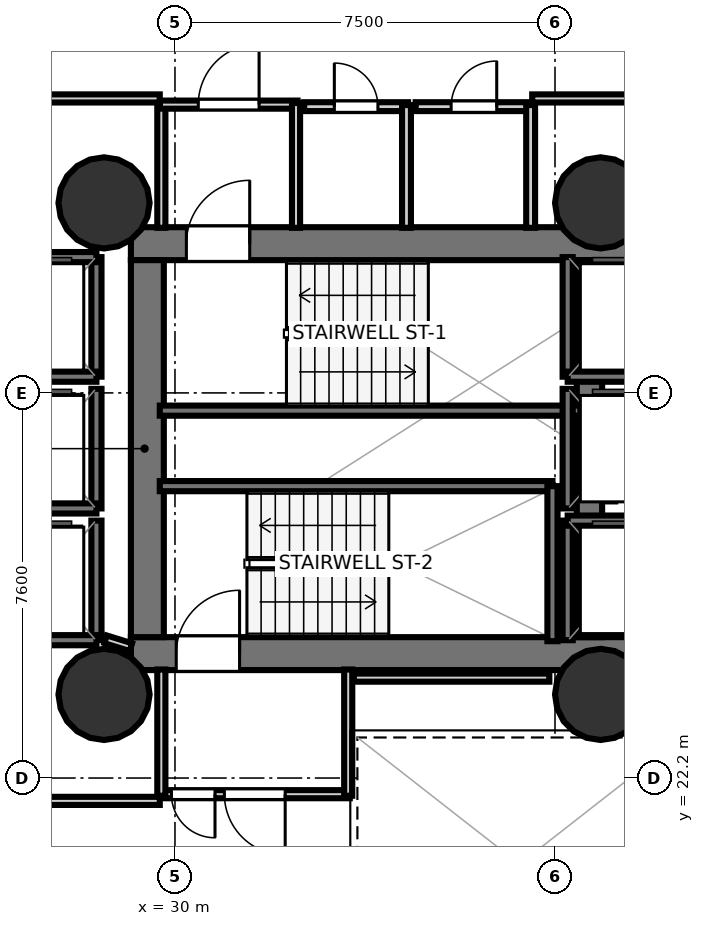
"""IFC4 building model, lengths in metres.
Left out: names, types, materials, properties, quantities, classifications, styles, units other than length and angle.
Written with IfcOpenShell. Run it as: python <this file> out.ifc"""

import sys

from ifc_helpers import new_model, si_unit, direction, frame, frame_2d, origin, origin_2d, place, context, subcontext, project, spatial, rectangle, hollow_circle, extrude, element, fill, save


model = new_model("IFC4")
c1 = context("Model", 3, precision=1e-05, world=origin(), true_north=direction((0.0, 1.0)))
c2 = subcontext(c1, "Body", "Model", "MODEL_VIEW")
j1 = project(units=[si_unit("LENGTHUNIT", "METRE"), si_unit("PLANEANGLEUNIT", "RADIAN")], contexts=[c1])
p1 = place(None, origin())
s1 = spatial("IfcSite", under=j1, at=p1, CompositionType="ELEMENT")
p2 = place(p1, origin())
s2 = spatial("IfcBuilding", under=s1, at=p2, CompositionType="ELEMENT")
p3 = place(p2, frame((0.0, 0.0, 36.8)))
s3 = spatial("IfcBuildingStorey", under=s2, at=p3, CompositionType="ELEMENT", Elevation=36.8)
p4 = place(p3, frame((29.13, 32.745, 0.0), z_axis=(0.0, 0.0, 1.0), x_axis=(1.0, 0.0, 0.0)))
e1 = element("IfcWall", 1, at=p4, inside=s3, PredefinedType="SHEAR", context=c2, shape_type="SweptSolid", body=[
    extrude(rectangle(XDim=10.72, YDim=0.65, at=frame_2d((5.36, 0.0))), origin(), (0.0, 0.0, 1.0), 3.52),
])
p5 = place(p4, frame((1.095, 0.0, 0.0)))
e2 = element("IfcOpeningElement", 2, at=p5, cuts=e1, PredefinedType="OPENING", context=c2, shape_type="SweptSolid", body=[
    extrude(rectangle(XDim=1.25, YDim=2.15, at=frame_2d((0.625, 1.075))), frame((0.0, 0.335, 0.0), z_axis=(0.0, -1.0, 0.0), x_axis=(1.0, 0.0, 0.0)), (0.0, 0.0, 1.0), 0.67),
])
p6 = place(p3, frame((29.13, 24.655, 0.0), z_axis=(0.0, 0.0, 1.0), x_axis=(1.0, 0.0, 0.0)))
e3 = element("IfcWall", 3, at=p6, inside=s3, PredefinedType="SHEAR", context=c2, shape_type="SweptSolid", body=[
    extrude(rectangle(XDim=10.72, YDim=0.65, at=frame_2d((5.36, 0.0))), origin(), (0.0, 0.0, 1.0), 3.52),
])
p7 = place(p6, frame((0.895, 0.0, 0.0)))
e4 = element("IfcOpeningElement", 4, at=p7, cuts=e3, PredefinedType="OPENING", context=c2, shape_type="SweptSolid", body=[
    extrude(rectangle(XDim=1.25, YDim=2.15, at=frame_2d((0.625, 1.075))), frame((0.0, 0.335, 0.0), z_axis=(0.0, -1.0, 0.0), x_axis=(1.0, 0.0, 0.0)), (0.0, 0.0, 1.0), 0.67),
])
p8 = place(p3, frame((29.455, 24.98, 0.0), z_axis=(0.0, 0.0, 1.0), x_axis=(0.0, 1.0, 0.0)))
e5 = element("IfcWall", 5, at=p8, inside=s3, PredefinedType="SHEAR", context=c2, shape_type="SweptSolid", body=[
    extrude(rectangle(XDim=7.44, YDim=0.65, at=frame_2d((3.72, 0.0))), origin(), (0.0, 0.0, 1.0), 3.52),
])
p9 = place(p3, frame((38.18, 24.98, 0.0), z_axis=(0.0, 0.0, 1.0), x_axis=(0.0, 1.0, 0.0)))
e6 = element("IfcWall", 6, at=p9, inside=s3, PredefinedType="SHEAR", context=c2, shape_type="SweptSolid", body=[
    extrude(rectangle(XDim=7.44, YDim=0.5, at=frame_2d((3.72, 0.0))), origin(), (0.0, 0.0, 1.0), 3.52),
])
for number, where, z_axis, x_axis in (
    (7, (28.6, 33.55, 0.0), (0.0, 0.0, 1.0), (1.0, 0.0, 0.0)),
    (8, (28.6, 23.85, 0.0), (0.0, 0.0, 1.0), (1.0, 0.0, 0.0)),
    (9, (38.4, 33.55, 0.0), (0.0, 0.0, 1.0), (1.0, 0.0, 0.0)),
    (10, (38.4, 23.85, 0.0), (0.0, 0.0, 1.0), (1.0, 0.0, 0.0)),
):
    element("IfcColumn", number, at=place(p3, frame(where, z_axis=z_axis, x_axis=x_axis)), inside=s3, PredefinedType="COLUMN", context=c2, shape_type="SweptSolid", body=[
        extrude(hollow_circle(Radius=0.9, WallThickness=0.045, at=origin_2d()), origin(), (0.0, 0.0, 1.0), 3.7),
    ])
p10 = place(p3, frame((29.7, 29.45, 0.0), z_axis=(0.0, 0.0, 1.0), x_axis=(1.0, 0.0, 0.0)))
e11 = element("IfcWall", 11, at=p10, inside=s3, PredefinedType="SOLIDWALL", context=c2, shape_type="SweptSolid", body=[
    extrude(rectangle(XDim=8.3, YDim=0.2, at=frame_2d((4.15, 0.0))), origin(), (0.0, 0.0, 1.0), 3.52),
])
p11 = place(p3, frame((29.7, 27.96, 0.0), z_axis=(0.0, 0.0, 1.0), x_axis=(1.0, 0.0, 0.0)))
e12 = element("IfcWall", 12, at=p11, inside=s3, PredefinedType="SOLIDWALL", context=c2, shape_type="SweptSolid", body=[
    extrude(rectangle(XDim=7.75, YDim=0.2, at=frame_2d((3.875, 0.0))), origin(), (0.0, 0.0, 1.0), 3.52),
])
p12 = place(p3, frame((37.45, 24.9, 0.0), z_axis=(0.0, 0.0, 1.0), x_axis=(0.0, 1.0, 0.0)))
e13 = element("IfcWall", 13, at=p12, inside=s3, PredefinedType="SOLIDWALL", context=c2, shape_type="SweptSolid", body=[
    extrude(rectangle(XDim=3.06, YDim=0.2, at=frame_2d((1.53, 0.0))), origin(), (0.0, 0.0, 1.0), 3.52),
])
p13 = place(p3, frame((37.75, 30.12, 0.0), z_axis=(0.0, 0.0, 1.0), x_axis=(0.0, 1.0, 0.0)))
e14 = element("IfcWall", 14, at=p13, inside=s3, PredefinedType="SOLIDWALL", context=c2, shape_type="SweptSolid", body=[
    extrude(rectangle(XDim=2.36, YDim=0.2, at=frame_2d((1.18, 0.0))), origin(), (0.0, 0.0, 1.0), 3.52),
])
p14 = place(p3, frame((37.75, 30.12, 0.0), z_axis=(0.0, 0.0, 1.0), x_axis=(1.0, 0.0, 0.0)))
e15 = element("IfcWall", 15, at=p14, inside=s3, PredefinedType="SOLIDWALL", context=c2, shape_type="SweptSolid", body=[
    extrude(rectangle(XDim=2.1, YDim=0.2, at=frame_2d((1.05, 0.0))), origin(), (0.0, 0.0, 1.0), 3.52),
])
p15 = place(p3, frame((37.75, 24.92, 0.0), z_axis=(0.0, 0.0, 1.0), x_axis=(0.0, 1.0, 0.0)))
e16 = element("IfcWall", 16, at=p15, inside=s3, PredefinedType="SOLIDWALL", context=c2, shape_type="SweptSolid", body=[
    extrude(rectangle(XDim=2.36, YDim=0.2, at=frame_2d((1.18, 0.0))), origin(), (0.0, 0.0, 1.0), 3.52),
])
p16 = place(p3, frame((37.75, 27.28, 0.0), z_axis=(0.0, 0.0, 1.0), x_axis=(1.0, 0.0, 0.0)))
e17 = element("IfcWall", 17, at=p16, inside=s3, PredefinedType="SOLIDWALL", context=c2, shape_type="SweptSolid", body=[
    extrude(rectangle(XDim=2.1, YDim=0.2, at=frame_2d((1.05, 0.0))), origin(), (0.0, 0.0, 1.0), 3.52),
])
p17 = place(p3, frame((28.45, 30.12, 0.0), z_axis=(0.0, 0.0, 1.0), x_axis=(0.0, 1.0, 0.0)))
e18 = element("IfcWall", 18, at=p17, inside=s3, PredefinedType="SOLIDWALL", context=c2, shape_type="SweptSolid", body=[
    extrude(rectangle(XDim=2.36, YDim=0.2, at=frame_2d((1.18, 0.0))), origin(), (0.0, 0.0, 1.0), 3.52),
])
for number, where, z_axis, x_axis in (
    (19, (26.35, 32.48, 0.0), (0.0, 0.0, 1.0), (1.0, 0.0, 0.0)),
    (20, (26.35, 30.12, 0.0), (0.0, 0.0, 1.0), (1.0, 0.0, 0.0)),
):
    element("IfcWall", number, at=place(p3, frame(where, z_axis=z_axis, x_axis=x_axis)), inside=s3, PredefinedType="SOLIDWALL", context=c2, shape_type="SweptSolid", body=[
        extrude(rectangle(XDim=2.1, YDim=0.2, at=frame_2d((1.05, 0.0))), origin(), (0.0, 0.0, 1.0), 3.52),
    ])
p18 = place(p3, frame((28.45, 27.52, 0.0), z_axis=(0.0, 0.0, 1.0), x_axis=(0.0, 1.0, 0.0)))
e21 = element("IfcWall", 21, at=p18, inside=s3, PredefinedType="SOLIDWALL", context=c2, shape_type="SweptSolid", body=[
    extrude(rectangle(XDim=2.36, YDim=0.2, at=frame_2d((1.18, 0.0))), origin(), (0.0, 0.0, 1.0), 3.52),
])
p19 = place(p3, frame((26.35, 27.52, 0.0), z_axis=(0.0, 0.0, 1.0), x_axis=(1.0, 0.0, 0.0)))
e22 = element("IfcWall", 22, at=p19, inside=s3, PredefinedType="SOLIDWALL", context=c2, shape_type="SweptSolid", body=[
    extrude(rectangle(XDim=2.1, YDim=0.2, at=frame_2d((1.05, 0.0))), origin(), (0.0, 0.0, 1.0), 3.52),
])
p20 = place(p3, frame((28.45, 24.92, 0.0), z_axis=(0.0, 0.0, 1.0), x_axis=(0.0, 1.0, 0.0)))
e23 = element("IfcWall", 23, at=p20, inside=s3, PredefinedType="SOLIDWALL", context=c2, shape_type="SweptSolid", body=[
    extrude(rectangle(XDim=2.36, YDim=0.2, at=frame_2d((1.18, 0.0))), origin(), (0.0, 0.0, 1.0), 3.52),
])
p21 = place(p3, frame((26.35, 24.92, 0.0), z_axis=(0.0, 0.0, 1.0), x_axis=(1.0, 0.0, 0.0)))
e24 = element("IfcWall", 24, at=p21, inside=s3, PredefinedType="SOLIDWALL", context=c2, shape_type="SweptSolid", body=[
    extrude(rectangle(XDim=2.1, YDim=0.2, at=frame_2d((1.05, 0.0))), origin(), (0.0, 0.0, 1.0), 3.52),
])
p22 = place(p3, frame((37.75, 27.52, 0.0), z_axis=(0.0, 0.0, 1.0), x_axis=(0.0, 1.0, 0.0)))
e25 = element("IfcWall", 25, at=p22, inside=s3, PredefinedType="SOLIDWALL", context=c2, shape_type="SweptSolid", body=[
    extrude(rectangle(XDim=2.36, YDim=0.2, at=frame_2d((1.18, 0.0))), origin(), (0.0, 0.0, 1.0), 3.52),
])
p23 = place(p3, frame((29.731, 33.058, 0.0), z_axis=(0.0, 0.0, 1.0), x_axis=(0.0, 1.0, 0.0)))
e26 = element("IfcWall", 26, at=p23, inside=s3, PredefinedType="PARTITIONING", context=c2, shape_type="SweptSolid", body=[
    extrude(rectangle(XDim=2.462, YDim=0.16, at=frame_2d((1.231, 0.0))), origin(), (0.0, 0.0, 1.0), 2.84),
])
p24 = place(p3, frame((29.7, 35.489, 0.0), z_axis=(0.0, 0.0, 1.0), x_axis=(1.0, 0.0, 0.0)))
e27 = element("IfcWall", 27, at=p24, inside=s3, PredefinedType="PARTITIONING", context=c2, shape_type="SweptSolid", body=[
    extrude(rectangle(XDim=2.72, YDim=0.16, at=frame_2d((1.36, 0.0))), origin(), (0.0, 0.0, 1.0), 2.84),
])
p25 = place(p24, frame((0.76, 0.0, 0.0)))
e28 = element("IfcOpeningElement", 28, at=p25, cuts=e27, PredefinedType="OPENING", context=c2, shape_type="SweptSolid", body=[
    extrude(rectangle(XDim=1.2, YDim=2.15, at=frame_2d((0.6, 1.075))), frame((0.0, 0.09, 0.0), z_axis=(0.0, -1.0, 0.0), x_axis=(1.0, 0.0, 0.0)), (0.0, 0.0, 1.0), 0.18),
])
p26 = place(p3, frame((32.389, 35.52, 0.0), z_axis=(0.0, 0.0, 1.0), x_axis=(0.0, -1.0, 0.0)))
e29 = element("IfcWall", 29, at=p26, inside=s3, PredefinedType="PARTITIONING", context=c2, shape_type="SweptSolid", body=[
    extrude(rectangle(XDim=2.462, YDim=0.16, at=frame_2d((1.231, 0.0))), origin(), (0.0, 0.0, 1.0), 2.84),
])
p27 = place(p3, frame((33.45, 21.881, 0.0), z_axis=(0.0, 0.0, 1.0), x_axis=(-1.0, 0.0, 0.0)))
e30 = element("IfcWall", 30, at=p27, inside=s3, PredefinedType="PARTITIONING", context=c2, shape_type="SweptSolid", body=[
    extrude(rectangle(XDim=3.75, YDim=0.16, at=frame_2d((1.875, 0.0))), origin(), (0.0, 0.0, 1.0), 2.84),
])
p28 = place(p27, frame((1.275, 0.0, 0.0)))
e31 = element("IfcOpeningElement", 31, at=p28, cuts=e30, PredefinedType="OPENING", context=c2, shape_type="SweptSolid", body=[
    extrude(rectangle(XDim=1.2, YDim=2.15, at=frame_2d((0.6, 1.075))), frame((0.0, 0.09, 0.0), z_axis=(0.0, -1.0, 0.0), x_axis=(1.0, 0.0, 0.0)), (0.0, 0.0, 1.0), 0.18),
])
p29 = place(p27, frame((2.66, 0.0, 0.0)))
e32 = element("IfcOpeningElement", 32, at=p29, cuts=e30, PredefinedType="OPENING", context=c2, shape_type="SweptSolid", body=[
    extrude(rectangle(XDim=0.86, YDim=2.05, at=frame_2d((0.43, 1.025))), frame((0.0, 0.09, 0.0), z_axis=(0.0, -1.0, 0.0), x_axis=(1.0, 0.0, 0.0)), (0.0, 0.0, 1.0), 0.18),
])
for number, where, z_axis, x_axis in (
    (33, (29.731, 21.85, 0.0), (0.0, 0.0, 1.0), (0.0, 1.0, 0.0)),
    (34, (33.419, 24.342, 0.0), (0.0, 0.0, 1.0), (0.0, -1.0, 0.0)),
):
    element("IfcWall", number, at=place(p3, frame(where, z_axis=z_axis, x_axis=x_axis)), inside=s3, PredefinedType="PARTITIONING", context=c2, shape_type="SweptSolid", body=[
        extrude(rectangle(XDim=2.492, YDim=0.16, at=frame_2d((1.246, 0.0))), origin(), (0.0, 0.0, 1.0), 2.84),
    ])
p30 = place(p3, frame((32.55, 35.449, 0.0), z_axis=(0.0, 0.0, 1.0), x_axis=(1.0, 0.0, 0.0)))
e35 = element("IfcWall", 35, at=p30, inside=s3, PredefinedType="PLUMBINGWALL", context=c2, shape_type="SweptSolid", body=[
    extrude(rectangle(XDim=2.05, YDim=0.175, at=frame_2d((1.025, 0.0))), origin(), (0.0, 0.0, 1.0), 2.84),
])
p31 = place(p30, frame((0.595, 0.0, 0.0)))
e36 = element("IfcOpeningElement", 36, at=p31, cuts=e35, PredefinedType="OPENING", context=c2, shape_type="SweptSolid", body=[
    extrude(rectangle(XDim=0.86, YDim=2.05, at=frame_2d((0.43, 1.025))), frame((0.0, 0.097, 0.0), z_axis=(0.0, -1.0, 0.0), x_axis=(1.0, 0.0, 0.0)), (0.0, 0.0, 1.0), 0.195),
])
p32 = place(p3, frame((34.569, 35.48, 0.0), z_axis=(0.0, 0.0, 1.0), x_axis=(0.0, -1.0, 0.0)))
e37 = element("IfcWall", 37, at=p32, inside=s3, PredefinedType="PLUMBINGWALL", context=c2, shape_type="SweptSolid", body=[
    extrude(rectangle(XDim=2.422, YDim=0.175, at=frame_2d((1.211, 0.0))), origin(), (0.0, 0.0, 1.0), 2.84),
])
p33 = place(p3, frame((34.75, 35.449, 0.0), z_axis=(0.0, 0.0, 1.0), x_axis=(1.0, 0.0, 0.0)))
e38 = element("IfcWall", 38, at=p33, inside=s3, PredefinedType="PLUMBINGWALL", context=c2, shape_type="SweptSolid", body=[
    extrude(rectangle(XDim=2.3, YDim=0.175, at=frame_2d((1.15, 0.0))), origin(), (0.0, 0.0, 1.0), 2.84),
])
p34 = place(p33, frame((0.7, 0.0, 0.0)))
e39 = element("IfcOpeningElement", 39, at=p34, cuts=e38, PredefinedType="OPENING", context=c2, shape_type="SweptSolid", body=[
    extrude(rectangle(XDim=0.9, YDim=2.1, at=frame_2d((0.45, 1.05))), frame((0.0, 0.097, 0.0), z_axis=(0.0, -1.0, 0.0), x_axis=(1.0, 0.0, 0.0)), (0.0, 0.0, 1.0), 0.195),
])
p35 = place(p3, frame((37.019, 35.48, 0.0), z_axis=(0.0, 0.0, 1.0), x_axis=(0.0, -1.0, 0.0)))
e40 = element("IfcWall", 40, at=p35, inside=s3, PredefinedType="PLUMBINGWALL", context=c2, shape_type="SweptSolid", body=[
    extrude(rectangle(XDim=2.422, YDim=0.175, at=frame_2d((1.211, 0.0))), origin(), (0.0, 0.0, 1.0), 2.84),
])
p36 = place(p3, frame((29.13, 24.782, 0.0), z_axis=(0.0, 0.0, 1.0), x_axis=(-0.955000482512, 0.296604245422, 0.0)))
e41 = element("IfcWall", 41, at=p36, inside=s3, PredefinedType="PARTITIONING", context=c2, shape_type="SweptSolid", body=[
    extrude(rectangle(XDim=0.524, YDim=0.16, at=frame_2d((0.262, 0.0))), origin(), (0.0, 0.0, 1.0), 2.84),
])
p37 = place(p3, frame((37.389, 24.181, 0.0), z_axis=(0.0, 0.0, 1.0), x_axis=(-1.0, 0.0, 0.0)))
e42 = element("IfcWall", 42, at=p37, inside=s3, PredefinedType="PARTITIONING", context=c2, shape_type="SweptSolid", body=[
    extrude(rectangle(XDim=3.859, YDim=0.16, at=frame_2d((1.929, 0.0))), origin(), (0.0, 0.0, 1.0), 2.84),
])
p38 = place(p3, frame((39.818, 35.611, 0.0), z_axis=(0.0, 0.0, 1.0), x_axis=(-1.0, 0.0, 0.0)))
e43 = element("IfcWall", 43, at=p38, inside=s3, PredefinedType="PARTITIONING", context=c2, shape_type="SweptSolid", body=[
    extrude(rectangle(XDim=2.768, YDim=0.16, at=frame_2d((1.384, 0.0))), origin(), (0.0, 0.0, 1.0), 2.84),
])
p39 = place(p3, frame((29.7, 35.611, 0.0), z_axis=(0.0, 0.0, 1.0), x_axis=(-1.0, 0.0, 0.0)))
e44 = element("IfcWall", 44, at=p39, inside=s3, PredefinedType="PARTITIONING", context=c2, shape_type="SweptSolid", body=[
    extrude(rectangle(XDim=3.28, YDim=0.16, at=frame_2d((1.64, 0.0))), origin(), (0.0, 0.0, 1.0), 2.798),
])
p40 = place(p3, frame((26.42, 21.749, 0.0), z_axis=(0.0, 0.0, 1.0), x_axis=(1.0, 0.0, 0.0)))
e45 = element("IfcWall", 45, at=p40, inside=s3, PredefinedType="PARTITIONING", context=c2, shape_type="SweptSolid", body=[
    extrude(rectangle(XDim=3.28, YDim=0.16, at=frame_2d((1.64, 0.0))), origin(), (0.0, 0.0, 1.0), 2.84),
])
p41 = place(p5, origin())
e46 = element("IfcDoor", 46, at=p41, inside=s3, OperationType="SINGLE_SWING_RIGHT", PredefinedType="DOOR", context=c2, shape_type="SweptSolid", body=[
    extrude(rectangle(XDim=1.25, YDim=2.15, at=frame_2d((0.625, 1.075))), frame((0.0, 0.025, 0.0), z_axis=(0.0, -1.0, 0.0), x_axis=(1.0, 0.0, 0.0)), (0.0, 0.0, 1.0), 0.05),
])
fill(e2, e46)
p42 = place(p7, origin())
e47 = element("IfcDoor", 47, at=p42, inside=s3, OperationType="SINGLE_SWING_RIGHT", PredefinedType="DOOR", context=c2, shape_type="SweptSolid", body=[
    extrude(rectangle(XDim=1.25, YDim=2.15, at=frame_2d((0.625, 1.075))), frame((0.0, 0.025, 0.0), z_axis=(0.0, -1.0, 0.0), x_axis=(1.0, 0.0, 0.0)), (0.0, 0.0, 1.0), 0.05),
])
fill(e4, e47)
p43 = place(p25, origin())
e48 = element("IfcDoor", 48, at=p43, inside=s3, OperationType="SINGLE_SWING_RIGHT", PredefinedType="DOOR", context=c2, shape_type="SweptSolid", body=[
    extrude(rectangle(XDim=1.2, YDim=2.15, at=frame_2d((0.6, 1.075))), frame((0.0, 0.025, 0.0), z_axis=(0.0, -1.0, 0.0), x_axis=(1.0, 0.0, 0.0)), (0.0, 0.0, 1.0), 0.05),
])
fill(e28, e48)
p44 = place(p28, origin())
e49 = element("IfcDoor", 49, at=p44, inside=s3, OperationType="SINGLE_SWING_LEFT", PredefinedType="DOOR", context=c2, shape_type="SweptSolid", body=[
    extrude(rectangle(XDim=1.2, YDim=2.15, at=frame_2d((0.6, 1.075))), frame((0.0, 0.025, 0.0), z_axis=(0.0, -1.0, 0.0), x_axis=(1.0, 0.0, 0.0)), (0.0, 0.0, 1.0), 0.05),
])
fill(e31, e49)
p45 = place(p31, origin())
e50 = element("IfcDoor", 50, at=p45, inside=s3, OperationType="SINGLE_SWING_LEFT", PredefinedType="DOOR", context=c2, shape_type="SweptSolid", body=[
    extrude(rectangle(XDim=0.86, YDim=2.05, at=frame_2d((0.43, 1.025))), frame((0.0, 0.025, 0.0), z_axis=(0.0, -1.0, 0.0), x_axis=(1.0, 0.0, 0.0)), (0.0, 0.0, 1.0), 0.05),
])
fill(e36, e50)
p46 = place(p34, origin())
e51 = element("IfcDoor", 51, at=p46, inside=s3, OperationType="SINGLE_SWING_RIGHT", PredefinedType="DOOR", context=c2, shape_type="SweptSolid", body=[
    extrude(rectangle(XDim=0.9, YDim=2.1, at=frame_2d((0.45, 1.05))), frame((0.0, 0.025, 0.0), z_axis=(0.0, -1.0, 0.0), x_axis=(1.0, 0.0, 0.0)), (0.0, 0.0, 1.0), 0.05),
])
fill(e39, e51)
p47 = place(p29, origin())
e52 = element("IfcDoor", 52, at=p47, inside=s3, OperationType="SINGLE_SWING_LEFT", PredefinedType="DOOR", context=c2, shape_type="SweptSolid", body=[
    extrude(rectangle(XDim=0.86, YDim=2.05, at=frame_2d((0.43, 1.025))), frame((0.0, 0.025, 0.0), z_axis=(0.0, -1.0, 0.0), x_axis=(1.0, 0.0, 0.0)), (0.0, 0.0, 1.0), 0.05),
])
fill(e32, e52)
save(model, sys.argv[1])
